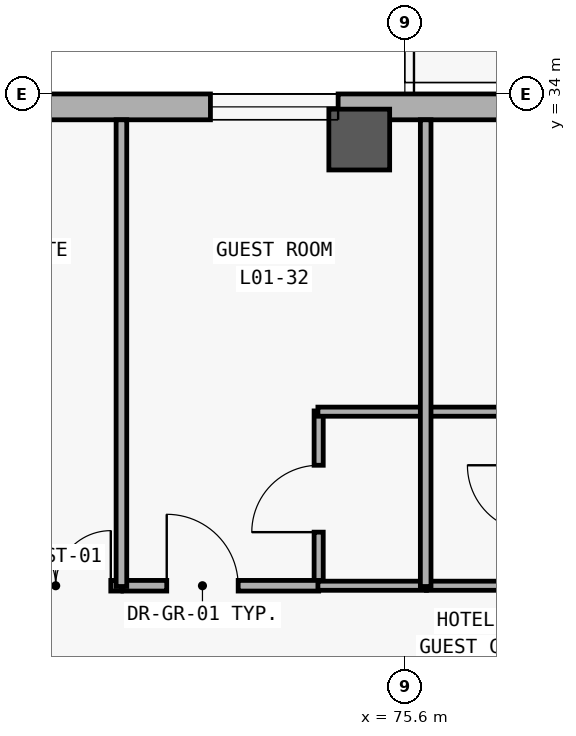
"""IFC4 building model, lengths in metres.
Left out: names, types, materials, properties, quantities, classifications, styles, units other than length and angle.
Written with IfcOpenShell. Run it as: python <this file> out.ifc"""

import sys

from ifc_helpers import new_model, si_unit, direction, frame, frame_2d, origin, origin_2d, place, context, subcontext, project, spatial, rectangle, extrude, element, fill, save


model = new_model("IFC4")
c1 = context("Model", 3, precision=1e-05, world=origin(), true_north=direction((0.0, 1.0)))
c2 = subcontext(c1, "Body", "Model", "MODEL_VIEW")
j1 = project(units=[si_unit("LENGTHUNIT", "METRE"), si_unit("PLANEANGLEUNIT", "RADIAN")], contexts=[c1])
p1 = place(None, origin())
s1 = spatial("IfcSite", under=j1, at=p1, CompositionType="ELEMENT")
p2 = place(p1, origin())
s2 = spatial("IfcBuilding", under=s1, at=p2, CompositionType="ELEMENT")
p3 = place(p2, frame((0.0, 0.0, 5.4)))
s3 = spatial("IfcBuildingStorey", under=s2, at=p3, CompositionType="ELEMENT", Elevation=5.4)
p4 = place(p3, frame((75.0, 33.4, 0.0), z_axis=(0.0, 0.0, 1.0), x_axis=(1.0, 0.0, 0.0)))
e1 = element("IfcColumn", 1, at=p4, inside=s3, PredefinedType="COLUMN", context=c2, shape_type="SweptSolid", body=[
    extrude(rectangle(XDim=0.8, YDim=0.8, at=origin_2d()), origin(), (0.0, 0.0, 1.0), 5.4),
])
p5 = place(p3, frame((8.74, 33.83, 0.0), z_axis=(0.0, 0.0, 1.0), x_axis=(1.0, 0.0, 0.0)))
e2 = element("IfcWall", 2, at=p5, inside=s3, PredefinedType="SOLIDWALL", context=c2, shape_type="SweptSolid", body=[
    extrude(rectangle(XDim=83.32, YDim=0.34, at=frame_2d((41.66, 0.0))), origin(), (0.0, 0.0, 1.0), 5.1),
])
p6 = place(p5, frame((4.795, 0.0, 0.85)))
e3 = element("IfcOpeningElement", 3, at=p6, cuts=e2, PredefinedType="OPENING", context=c2, shape_type="SweptSolid", body=[
    extrude(rectangle(XDim=1.58, YDim=1.85, at=frame_2d((0.79, 0.925))), frame((0.0, 0.18, 0.0), z_axis=(0.0, -1.0, 0.0), x_axis=(1.0, 0.0, 0.0)), (0.0, 0.0, 1.0), 0.36),
])
p7 = place(p5, frame((11.542, 0.0, 0.85)))
e4 = element("IfcOpeningElement", 4, at=p7, cuts=e2, PredefinedType="OPENING", context=c2, shape_type="SweptSolid", body=[
    extrude(rectangle(XDim=3.1, YDim=2.2, at=frame_2d((1.55, 1.1))), frame((0.0, 0.18, 0.0), z_axis=(0.0, -1.0, 0.0), x_axis=(1.0, 0.0, 0.0)), (0.0, 0.0, 1.0), 0.36),
])
p8 = place(p5, frame((16.471, 0.0, 0.85)))
e5 = element("IfcOpeningElement", 5, at=p8, cuts=e2, PredefinedType="OPENING", context=c2, shape_type="SweptSolid", body=[
    extrude(rectangle(XDim=1.25, YDim=1.45, at=frame_2d((0.625, 0.725))), frame((0.0, 0.18, 0.0), z_axis=(0.0, -1.0, 0.0), x_axis=(1.0, 0.0, 0.0)), (0.0, 0.0, 1.0), 0.36),
])
p9 = place(p5, frame((20.425, 0.0, 0.85)))
e6 = element("IfcOpeningElement", 6, at=p9, cuts=e2, PredefinedType="OPENING", context=c2, shape_type="SweptSolid", body=[
    extrude(rectangle(XDim=1.35, YDim=1.55, at=frame_2d((0.675, 0.775))), frame((0.0, 0.18, 0.0), z_axis=(0.0, -1.0, 0.0), x_axis=(1.0, 0.0, 0.0)), (0.0, 0.0, 1.0), 0.36),
])
p10 = place(p5, frame((24.379, 0.0, 0.85)))
e7 = element("IfcOpeningElement", 7, at=p10, cuts=e2, PredefinedType="OPENING", context=c2, shape_type="SweptSolid", body=[
    extrude(rectangle(XDim=1.45, YDim=1.65, at=frame_2d((0.725, 0.825))), frame((0.0, 0.18, 0.0), z_axis=(0.0, -1.0, 0.0), x_axis=(1.0, 0.0, 0.0)), (0.0, 0.0, 1.0), 0.36),
])
p11 = place(p5, frame((28.332, 0.0, 0.85)))
e8 = element("IfcOpeningElement", 8, at=p11, cuts=e2, PredefinedType="OPENING", context=c2, shape_type="SweptSolid", body=[
    extrude(rectangle(XDim=1.55, YDim=1.65, at=frame_2d((0.775, 0.825))), frame((0.0, 0.18, 0.0), z_axis=(0.0, -1.0, 0.0), x_axis=(1.0, 0.0, 0.0)), (0.0, 0.0, 1.0), 0.36),
])
p12 = place(p5, frame((32.261, 0.0, 0.85)))
e9 = element("IfcOpeningElement", 9, at=p12, cuts=e2, PredefinedType="OPENING", context=c2, shape_type="SweptSolid", body=[
    extrude(rectangle(XDim=1.7, YDim=2.0, at=frame_2d((0.85, 1.0))), frame((0.0, 0.18, 0.0), z_axis=(0.0, -1.0, 0.0), x_axis=(1.0, 0.0, 0.0)), (0.0, 0.0, 1.0), 0.36),
])
p13 = place(p5, frame((35.965, 0.0, 0.85)))
e10 = element("IfcOpeningElement", 10, at=p13, cuts=e2, PredefinedType="OPENING", context=c2, shape_type="SweptSolid", body=[
    extrude(rectangle(XDim=2.3, YDim=2.05, at=frame_2d((1.15, 1.025))), frame((0.0, 0.18, 0.0), z_axis=(0.0, -1.0, 0.0), x_axis=(1.0, 0.0, 0.0)), (0.0, 0.0, 1.0), 0.36),
])
p14 = place(p5, frame((39.744, 0.0, 0.85)))
e11 = element("IfcOpeningElement", 11, at=p14, cuts=e2, PredefinedType="OPENING", context=c2, shape_type="SweptSolid", body=[
    extrude(rectangle(XDim=2.75, YDim=2.1, at=frame_2d((1.375, 1.05))), frame((0.0, 0.18, 0.0), z_axis=(0.0, -1.0, 0.0), x_axis=(1.0, 0.0, 0.0)), (0.0, 0.0, 1.0), 0.36),
])
p15 = place(p5, frame((44.533, 0.0, 0.85)))
e12 = element("IfcOpeningElement", 12, at=p15, cuts=e2, PredefinedType="OPENING", context=c2, shape_type="SweptSolid", body=[
    extrude(rectangle(XDim=1.18, YDim=1.5, at=frame_2d((0.59, 0.75))), frame((0.0, 0.18, 0.0), z_axis=(0.0, -1.0, 0.0), x_axis=(1.0, 0.0, 0.0)), (0.0, 0.0, 1.0), 0.36),
])
p16 = place(p5, frame((48.487, 0.0, 0.85)))
e13 = element("IfcOpeningElement", 13, at=p16, cuts=e2, PredefinedType="OPENING", context=c2, shape_type="SweptSolid", body=[
    extrude(rectangle(XDim=1.28, YDim=1.6, at=frame_2d((0.64, 0.8))), frame((0.0, 0.18, 0.0), z_axis=(0.0, -1.0, 0.0), x_axis=(1.0, 0.0, 0.0)), (0.0, 0.0, 1.0), 0.36),
])
p17 = place(p5, frame((52.441, 0.0, 0.85)))
e14 = element("IfcOpeningElement", 14, at=p17, cuts=e2, PredefinedType="OPENING", context=c2, shape_type="SweptSolid", body=[
    extrude(rectangle(XDim=1.38, YDim=1.7, at=frame_2d((0.69, 0.85))), frame((0.0, 0.18, 0.0), z_axis=(0.0, -1.0, 0.0), x_axis=(1.0, 0.0, 0.0)), (0.0, 0.0, 1.0), 0.36),
])
p18 = place(p5, frame((56.395, 0.0, 0.85)))
e15 = element("IfcOpeningElement", 15, at=p18, cuts=e2, PredefinedType="OPENING", context=c2, shape_type="SweptSolid", body=[
    extrude(rectangle(XDim=1.48, YDim=1.8, at=frame_2d((0.74, 0.9))), frame((0.0, 0.18, 0.0), z_axis=(0.0, -1.0, 0.0), x_axis=(1.0, 0.0, 0.0)), (0.0, 0.0, 1.0), 0.36),
])
p19 = place(p5, frame((60.349, 0.0, 0.85)))
e16 = element("IfcOpeningElement", 16, at=p19, cuts=e2, PredefinedType="OPENING", context=c2, shape_type="SweptSolid", body=[
    extrude(rectangle(XDim=1.58, YDim=1.85, at=frame_2d((0.79, 0.925))), frame((0.0, 0.18, 0.0), z_axis=(0.0, -1.0, 0.0), x_axis=(1.0, 0.0, 0.0)), (0.0, 0.0, 1.0), 0.36),
])
p20 = place(p5, frame((64.302, 0.0, 0.85)))
e17 = element("IfcOpeningElement", 17, at=p20, cuts=e2, PredefinedType="OPENING", context=c2, shape_type="SweptSolid", body=[
    extrude(rectangle(XDim=1.68, YDim=1.9, at=frame_2d((0.84, 0.95))), frame((0.0, 0.18, 0.0), z_axis=(0.0, -1.0, 0.0), x_axis=(1.0, 0.0, 0.0)), (0.0, 0.0, 1.0), 0.36),
])
p21 = place(p5, frame((68.256, 0.0, 0.85)))
e18 = element("IfcOpeningElement", 18, at=p21, cuts=e2, PredefinedType="OPENING", context=c2, shape_type="SweptSolid", body=[
    extrude(rectangle(XDim=1.78, YDim=1.95, at=frame_2d((0.89, 0.975))), frame((0.0, 0.18, 0.0), z_axis=(0.0, -1.0, 0.0), x_axis=(1.0, 0.0, 0.0)), (0.0, 0.0, 1.0), 0.36),
])
p22 = place(p5, frame((72.21, 0.0, 0.85)))
e19 = element("IfcOpeningElement", 19, at=p22, cuts=e2, PredefinedType="OPENING", context=c2, shape_type="SweptSolid", body=[
    extrude(rectangle(XDim=1.88, YDim=1.95, at=frame_2d((0.94, 0.975))), frame((0.0, 0.18, 0.0), z_axis=(0.0, -1.0, 0.0), x_axis=(1.0, 0.0, 0.0)), (0.0, 0.0, 1.0), 0.36),
])
p23 = place(p5, frame((76.129, 0.0, 0.85)))
e20 = element("IfcOpeningElement", 20, at=p23, cuts=e2, PredefinedType="OPENING", context=c2, shape_type="SweptSolid", body=[
    extrude(rectangle(XDim=2.05, YDim=1.95, at=frame_2d((1.025, 0.975))), frame((0.0, 0.18, 0.0), z_axis=(0.0, -1.0, 0.0), x_axis=(1.0, 0.0, 0.0)), (0.0, 0.0, 1.0), 0.36),
])
p24 = place(p5, frame((80.068, 0.0, 0.85)))
e21 = element("IfcOpeningElement", 21, at=p24, cuts=e2, PredefinedType="OPENING", context=c2, shape_type="SweptSolid", body=[
    extrude(rectangle(XDim=2.18, YDim=1.95, at=frame_2d((1.09, 0.975))), frame((0.0, 0.18, 0.0), z_axis=(0.0, -1.0, 0.0), x_axis=(1.0, 0.0, 0.0)), (0.0, 0.0, 1.0), 0.36),
])
p25 = place(p3, frame((74.466, 27.52, 0.0), z_axis=(0.0, 0.0, 1.0), x_axis=(0.0, 1.0, 0.0)))
e22 = element("IfcWall", 22, at=p25, inside=s3, PredefinedType="PARTITIONING", context=c2, shape_type="SweptSolid", body=[
    extrude(rectangle(XDim=2.31, YDim=0.12, at=frame_2d((1.155, 0.0))), origin(), (0.0, 0.0, 1.0), 4.18),
])
p26 = place(p25, frame((0.715, 0.0, 0.0)))
e23 = element("IfcOpeningElement", 23, at=p26, cuts=e22, PredefinedType="OPENING", context=c2, shape_type="SweptSolid", body=[
    extrude(rectangle(XDim=0.88, YDim=2.15, at=frame_2d((0.44, 1.075))), frame((0.0, 0.07, 0.0), z_axis=(0.0, -1.0, 0.0), x_axis=(1.0, 0.0, 0.0)), (0.0, 0.0, 1.0), 0.14),
])
p27 = place(p3, frame((69.296, 27.53, 0.0), z_axis=(0.0, 0.0, 1.0), x_axis=(1.0, 0.0, 0.0)))
e24 = element("IfcWall", 24, at=p27, inside=s3, PredefinedType="PARTITIONING", context=c2, shape_type="SweptSolid", body=[
    extrude(rectangle(XDim=2.575, YDim=0.14, at=frame_2d((1.288, 0.0))), origin(), (0.0, 0.0, 1.0), 4.18),
])
p28 = place(p27, frame((0.985, 0.0, 0.0)))
e25 = element("IfcOpeningElement", 25, at=p28, cuts=e24, PredefinedType="OPENING", context=c2, shape_type="SweptSolid", body=[
    extrude(rectangle(XDim=1.45, YDim=2.3, at=frame_2d((0.725, 1.15))), frame((0.0, 0.08, 0.0), z_axis=(0.0, -1.0, 0.0), x_axis=(1.0, 0.0, 0.0)), (0.0, 0.0, 1.0), 0.16),
])
p29 = place(p3, frame((71.891, 27.53, 0.0), z_axis=(0.0, 0.0, 1.0), x_axis=(1.0, 0.0, 0.0)))
e26 = element("IfcWall", 26, at=p29, inside=s3, PredefinedType="PARTITIONING", context=c2, shape_type="SweptSolid", body=[
    extrude(rectangle(XDim=2.575, YDim=0.14, at=frame_2d((1.288, 0.0))), origin(), (0.0, 0.0, 1.0), 4.18),
])
p30 = place(p29, frame((0.576, 0.0, 0.0)))
e27 = element("IfcOpeningElement", 27, at=p30, cuts=e26, PredefinedType="OPENING", context=c2, shape_type="SweptSolid", body=[
    extrude(rectangle(XDim=0.94, YDim=2.2, at=frame_2d((0.47, 1.1))), frame((0.0, 0.08, 0.0), z_axis=(0.0, -1.0, 0.0), x_axis=(1.0, 0.0, 0.0)), (0.0, 0.0, 1.0), 0.16),
])
for number, where, z_axis, x_axis in (
    (28, (74.456, 27.53, 0.0), (0.0, 0.0, 1.0), (1.0, 0.0, 0.0)),
    (29, (74.456, 29.82, 0.0), (0.0, 0.0, 1.0), (1.0, 0.0, 0.0)),
):
    element("IfcWall", number, at=place(p3, frame(where, z_axis=z_axis, x_axis=x_axis)), inside=s3, PredefinedType="PARTITIONING", context=c2, shape_type="SweptSolid", body=[
        extrude(rectangle(XDim=1.428, YDim=0.12, at=frame_2d((0.714, 0.0))), origin(), (0.0, 0.0, 1.0), 4.18),
    ])
for number, where, z_axis, x_axis in (
    (30, (75.884, 27.53, 0.0), (0.0, 0.0, 1.0), (1.0, 0.0, 0.0)),
    (31, (75.884, 29.82, 0.0), (0.0, 0.0, 1.0), (1.0, 0.0, 0.0)),
):
    element("IfcWall", number, at=place(p3, frame(where, z_axis=z_axis, x_axis=x_axis)), inside=s3, PredefinedType="PARTITIONING", context=c2, shape_type="SweptSolid", body=[
        extrude(rectangle(XDim=1.429, YDim=0.12, at=frame_2d((0.714, 0.0))), origin(), (0.0, 0.0, 1.0), 4.18),
    ])
for number, where, z_axis, x_axis in (
    (32, (71.871, 27.52, 0.0), (0.0, 0.0, 1.0), (0.0, 1.0, 0.0)),
    (33, (75.874, 27.52, 0.0), (0.0, 0.0, 1.0), (0.0, 1.0, 0.0)),
):
    element("IfcWall", number, at=place(p3, frame(where, z_axis=z_axis, x_axis=x_axis)), inside=s3, PredefinedType="PARTITIONING", context=c2, shape_type="SweptSolid", body=[
        extrude(rectangle(XDim=6.14, YDim=0.14, at=frame_2d((3.07, 0.0))), origin(), (0.0, 0.0, 1.0), 4.18),
    ])
p31 = place(p20, origin())
e34 = element("IfcWindow", 34, at=p31, inside=s3, PartitioningType="SINGLE_PANEL", PredefinedType="WINDOW", context=c2, shape_type="SweptSolid", body=[
    extrude(rectangle(XDim=1.68, YDim=1.9, at=frame_2d((0.84, 0.95))), frame((0.0, 0.03, 0.0), z_axis=(0.0, -1.0, 0.0), x_axis=(1.0, 0.0, 0.0)), (0.0, 0.0, 1.0), 0.06),
])
fill(e17, e34)
p32 = place(p26, origin())
e35 = element("IfcDoor", 35, at=p32, inside=s3, OperationType="SINGLE_SWING_LEFT", PredefinedType="DOOR", context=c2, shape_type="SweptSolid", body=[
    extrude(rectangle(XDim=0.88, YDim=2.15, at=frame_2d((0.44, 1.075))), frame((0.0, 0.025, 0.0), z_axis=(0.0, -1.0, 0.0), x_axis=(1.0, 0.0, 0.0)), (0.0, 0.0, 1.0), 0.05),
])
fill(e23, e35)
p33 = place(p28, origin())
e36 = element("IfcDoor", 36, at=p33, inside=s3, OperationType="DOUBLE_DOOR_SINGLE_SWING", PredefinedType="DOOR", context=c2, shape_type="SweptSolid", body=[
    extrude(rectangle(XDim=1.45, YDim=2.3, at=frame_2d((0.725, 1.15))), frame((0.0, 0.025, 0.0), z_axis=(0.0, -1.0, 0.0), x_axis=(1.0, 0.0, 0.0)), (0.0, 0.0, 1.0), 0.05),
])
fill(e25, e36)
p34 = place(p30, origin())
e37 = element("IfcDoor", 37, at=p34, inside=s3, OperationType="SINGLE_SWING_LEFT", PredefinedType="DOOR", context=c2, shape_type="SweptSolid", body=[
    extrude(rectangle(XDim=0.94, YDim=2.2, at=frame_2d((0.47, 1.1))), frame((0.0, 0.025, 0.0), z_axis=(0.0, -1.0, 0.0), x_axis=(1.0, 0.0, 0.0)), (0.0, 0.0, 1.0), 0.05),
])
fill(e27, e37)
save(model, sys.argv[1])
